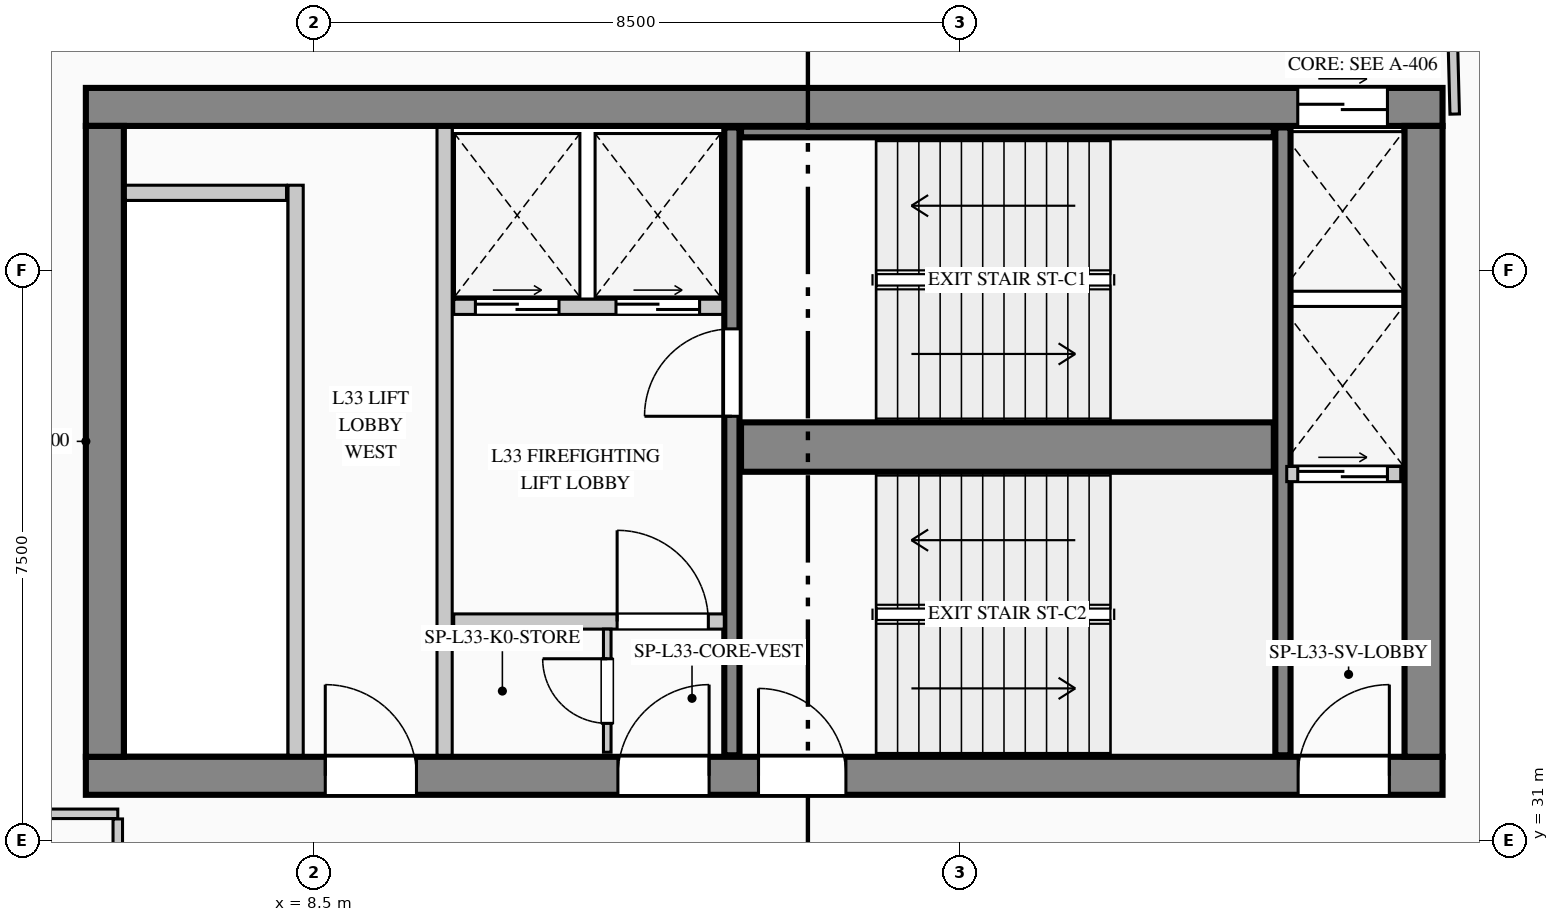
"""IFC4 building model, lengths in metres.
Left out: names, types, materials, properties, quantities, classifications, styles, units other than length and angle.
Written with IfcOpenShell. Run it as: python <this file> out.ifc"""

import sys

from ifc_helpers import new_model, si_unit, direction, frame, frame_2d, origin, place, context, subcontext, project, spatial, rectangle, extrude, element, fill, save


model = new_model("IFC4")
c1 = context("Model", 3, precision=1e-05, world=origin(), true_north=direction((0.0, 1.0)))
c2 = subcontext(c1, "Body", "Model", "MODEL_VIEW")
j1 = project(units=[si_unit("LENGTHUNIT", "METRE"), si_unit("PLANEANGLEUNIT", "RADIAN")], contexts=[c1])
p1 = place(None, origin())
s1 = spatial("IfcSite", under=j1, at=p1, CompositionType="ELEMENT")
p2 = place(p1, origin())
s2 = spatial("IfcBuilding", under=s1, at=p2, CompositionType="ELEMENT")
p3 = place(p2, frame((0.0, 0.0, 143.0)))
s3 = spatial("IfcBuildingStorey", under=s2, at=p3, CompositionType="ELEMENT", Elevation=143.0)
p4 = place(p3, frame((5.5, 40.65, 0.0), z_axis=(0.0, 0.0, 1.0), x_axis=(1.0, 0.0, 0.0)))
e1 = element("IfcWall", 1, at=p4, inside=s3, PredefinedType="SHEAR", context=c2, shape_type="SweptSolid", body=[
    extrude(rectangle(XDim=17.85, YDim=0.5, at=frame_2d((8.925, 0.0))), origin(), (0.0, 0.0, 1.0), 3.95),
])
p5 = place(p4, frame((15.945, 0.0, 0.0)))
e2 = element("IfcOpeningElement", 2, at=p5, cuts=e1, PredefinedType="OPENING", context=c2, shape_type="SweptSolid", body=[
    extrude(rectangle(XDim=1.18, YDim=2.25, at=frame_2d((0.59, 1.125))), frame((0.0, 0.26, 0.0), z_axis=(0.0, -1.0, 0.0), x_axis=(1.0, 0.0, 0.0)), (0.0, 0.0, 1.0), 0.52),
])
p6 = place(p3, frame((5.5, 31.85, 0.0), z_axis=(0.0, 0.0, 1.0), x_axis=(1.0, 0.0, 0.0)))
e3 = element("IfcWall", 3, at=p6, inside=s3, PredefinedType="SHEAR", context=c2, shape_type="SweptSolid", body=[
    extrude(rectangle(XDim=17.85, YDim=0.5, at=frame_2d((8.925, 0.0))), origin(), (0.0, 0.0, 1.0), 3.95),
])
p7 = place(p6, frame((3.15, 0.0, 0.0)))
e4 = element("IfcOpeningElement", 4, at=p7, cuts=e3, PredefinedType="OPENING", context=c2, shape_type="SweptSolid", body=[
    extrude(rectangle(XDim=1.2, YDim=2.2, at=frame_2d((0.6, 1.1))), frame((0.0, 0.26, 0.0), z_axis=(0.0, -1.0, 0.0), x_axis=(1.0, 0.0, 0.0)), (0.0, 0.0, 1.0), 0.52),
])
p8 = place(p6, frame((7.0, 0.0, 0.0)))
e5 = element("IfcOpeningElement", 5, at=p8, cuts=e3, PredefinedType="OPENING", context=c2, shape_type="SweptSolid", body=[
    extrude(rectangle(XDim=1.2, YDim=2.2, at=frame_2d((0.6, 1.1))), frame((0.0, 0.26, 0.0), z_axis=(0.0, -1.0, 0.0), x_axis=(1.0, 0.0, 0.0)), (0.0, 0.0, 1.0), 0.52),
])
p9 = place(p6, frame((8.85, 0.0, 0.0)))
e6 = element("IfcOpeningElement", 6, at=p9, cuts=e3, PredefinedType="OPENING", context=c2, shape_type="SweptSolid", body=[
    extrude(rectangle(XDim=1.15, YDim=2.2, at=frame_2d((0.575, 1.1))), frame((0.0, 0.26, 0.0), z_axis=(0.0, -1.0, 0.0), x_axis=(1.0, 0.0, 0.0)), (0.0, 0.0, 1.0), 0.52),
])
p10 = place(p6, frame((15.95, 0.0, 0.0)))
e7 = element("IfcOpeningElement", 7, at=p10, cuts=e3, PredefinedType="OPENING", context=c2, shape_type="SweptSolid", body=[
    extrude(rectangle(XDim=1.2, YDim=2.2, at=frame_2d((0.6, 1.1))), frame((0.0, 0.26, 0.0), z_axis=(0.0, -1.0, 0.0), x_axis=(1.0, 0.0, 0.0)), (0.0, 0.0, 1.0), 0.52),
])
for number, where, z_axis, x_axis in (
    (8, (5.75, 32.1, 0.0), (0.0, 0.0, 1.0), (0.0, 1.0, 0.0)),
    (9, (23.1, 32.1, 0.0), (0.0, 0.0, 1.0), (0.0, 1.0, 0.0)),
):
    element("IfcWall", number, at=place(p3, frame(where, z_axis=z_axis, x_axis=x_axis)), inside=s3, PredefinedType="SHEAR", context=c2, shape_type="SweptSolid", body=[
        extrude(rectangle(XDim=8.3, YDim=0.5, at=frame_2d((4.15, 0.0))), origin(), (0.0, 0.0, 1.0), 3.95),
    ])
p11 = place(p3, frame((14.0, 32.12, 0.0), z_axis=(0.0, 0.0, 1.0), x_axis=(0.0, 1.0, 0.0)))
e10 = element("IfcWall", 10, at=p11, inside=s3, PredefinedType="SHEAR", context=c2, shape_type="SweptSolid", body=[
    extrude(rectangle(XDim=8.26, YDim=0.2, at=frame_2d((4.13, 0.0))), origin(), (0.0, 0.0, 1.0), 3.95),
])
p12 = place(p11, frame((4.46, 0.0, 0.0)))
e11 = element("IfcOpeningElement", 11, at=p12, cuts=e10, PredefinedType="OPENING", context=c2, shape_type="SweptSolid", body=[
    extrude(rectangle(XDim=1.15, YDim=2.2, at=frame_2d((0.575, 1.1))), frame((0.0, 0.11, 0.0), z_axis=(0.0, -1.0, 0.0), x_axis=(1.0, 0.0, 0.0)), (0.0, 0.0, 1.0), 0.22),
])
p13 = place(p3, frame((14.12, 36.175, 0.0), z_axis=(0.0, 0.0, 1.0), x_axis=(1.0, 0.0, 0.0)))
e12 = element("IfcWall", 12, at=p13, inside=s3, PredefinedType="SHEAR", context=c2, shape_type="SweptSolid", body=[
    extrude(rectangle(XDim=7.01, YDim=0.65, at=frame_2d((3.505, 0.0))), origin(), (0.0, 0.0, 1.0), 3.95),
])
p14 = place(p3, frame((21.25, 32.12, 0.0), z_axis=(0.0, 0.0, 1.0), x_axis=(0.0, 1.0, 0.0)))
e13 = element("IfcWall", 13, at=p14, inside=s3, PredefinedType="SHEAR", context=c2, shape_type="SweptSolid", body=[
    extrude(rectangle(XDim=8.26, YDim=0.2, at=frame_2d((4.13, 0.0))), origin(), (0.0, 0.0, 1.0), 3.95),
])
p15 = place(p3, frame((14.12, 40.32, 0.0), z_axis=(0.0, 0.0, 1.0), x_axis=(1.0, 0.0, 0.0)))
e14 = element("IfcWall", 14, at=p15, inside=s3, PredefinedType="SHEAR", context=c2, shape_type="SweptSolid", body=[
    extrude(rectangle(XDim=7.01, YDim=0.14, at=frame_2d((3.505, 0.0))), origin(), (0.0, 0.0, 1.0), 3.95),
])
p16 = place(p3, frame((7.993, 4.73, 0.0), z_axis=(0.0, 0.0, 1.0), x_axis=(-0.136989009016, 0.990572567462, 0.0)))
e15 = element("IfcWall", 15, at=p16, inside=s3, PredefinedType="STANDARD", context=c2, shape_type="SweptSolid", body=[
    extrude(rectangle(XDim=36.888, YDim=0.26, at=frame_2d((18.444, 0.0))), origin(), (0.0, 0.0, 1.0), 3.69),
])
p17 = place(p16, frame((20.848, 0.0, 0.9)))
e16 = element("IfcOpeningElement", 16, at=p17, cuts=e15, PredefinedType="OPENING", context=c2, shape_type="SweptSolid", body=[
    extrude(rectangle(XDim=2.1, YDim=2.0, at=frame_2d((1.05, 1.0))), frame((0.0, 0.14, 0.0), z_axis=(0.0, -1.0, 0.0), x_axis=(1.0, 0.0, 0.0)), (0.0, 0.0, 1.0), 0.28),
])
p18 = place(p3, frame((8.26, 32.12, 0.0), z_axis=(0.0, 0.0, 1.0), x_axis=(0.0, 1.0, 0.0)))
e17 = element("IfcWall", 17, at=p18, inside=s3, PredefinedType="PARTITIONING", context=c2, shape_type="SweptSolid", body=[
    extrude(rectangle(XDim=7.5, YDim=0.2, at=frame_2d((3.75, 0.0))), origin(), (0.0, 0.0, 1.0), 3.69),
])
p19 = place(p3, frame((6.02, 39.52, 0.0), z_axis=(0.0, 0.0, 1.0), x_axis=(1.0, 0.0, 0.0)))
e18 = element("IfcWall", 18, at=p19, inside=s3, PredefinedType="PARTITIONING", context=c2, shape_type="SweptSolid", body=[
    extrude(rectangle(XDim=2.12, YDim=0.2, at=frame_2d((1.06, 0.0))), origin(), (0.0, 0.0, 1.0), 3.69),
])
p20 = place(p3, frame((10.22, 32.12, 0.0), z_axis=(0.0, 0.0, 1.0), x_axis=(0.0, 1.0, 0.0)))
e19 = element("IfcWall", 19, at=p20, inside=s3, PredefinedType="PARTITIONING", context=c2, shape_type="SweptSolid", body=[
    extrude(rectangle(XDim=8.26, YDim=0.2, at=frame_2d((4.13, 0.0))), origin(), (0.0, 0.0, 1.0), 3.69),
])
p21 = place(p3, frame((10.34, 38.02, 0.0), z_axis=(0.0, 0.0, 1.0), x_axis=(1.0, 0.0, 0.0)))
e20 = element("IfcWall", 20, at=p21, inside=s3, PredefinedType="PARTITIONING", context=c2, shape_type="SweptSolid", body=[
    extrude(rectangle(XDim=3.54, YDim=0.2, at=frame_2d((1.77, 0.0))), origin(), (0.0, 0.0, 1.0), 3.69),
])
p22 = place(p21, frame((0.285, 0.0, 0.0)))
e21 = element("IfcOpeningElement", 21, at=p22, cuts=e20, PredefinedType="OPENING", context=c2, shape_type="SweptSolid", body=[
    extrude(rectangle(XDim=1.1, YDim=2.2, at=frame_2d((0.55, 1.1))), frame((0.0, 0.11, 0.0), z_axis=(0.0, -1.0, 0.0), x_axis=(1.0, 0.0, 0.0)), (0.0, 0.0, 1.0), 0.22),
])
p23 = place(p21, frame((2.135, 0.0, 0.0)))
e22 = element("IfcOpeningElement", 22, at=p23, cuts=e20, PredefinedType="OPENING", context=c2, shape_type="SweptSolid", body=[
    extrude(rectangle(XDim=1.1, YDim=2.2, at=frame_2d((0.55, 1.1))), frame((0.0, 0.11, 0.0), z_axis=(0.0, -1.0, 0.0), x_axis=(1.0, 0.0, 0.0)), (0.0, 0.0, 1.0), 0.22),
])
p24 = place(p3, frame((10.34, 33.88, 0.0), z_axis=(0.0, 0.0, 1.0), x_axis=(1.0, 0.0, 0.0)))
e23 = element("IfcWall", 23, at=p24, inside=s3, PredefinedType="PARTITIONING", context=c2, shape_type="SweptSolid", body=[
    extrude(rectangle(XDim=3.56, YDim=0.2, at=frame_2d((1.78, 0.0))), origin(), (0.0, 0.0, 1.0), 3.69),
])
p25 = place(p24, frame((2.15, 0.0, 0.0)))
e24 = element("IfcOpeningElement", 24, at=p25, cuts=e23, PredefinedType="OPENING", context=c2, shape_type="SweptSolid", body=[
    extrude(rectangle(XDim=1.2, YDim=2.2, at=frame_2d((0.6, 1.1))), frame((0.0, 0.11, 0.0), z_axis=(0.0, -1.0, 0.0), x_axis=(1.0, 0.0, 0.0)), (0.0, 0.0, 1.0), 0.22),
])
p26 = place(p3, frame((12.36, 32.16, 0.0), z_axis=(0.0, 0.0, 1.0), x_axis=(0.0, 1.0, 0.0)))
e25 = element("IfcWall", 25, at=p26, inside=s3, PredefinedType="PARTITIONING", context=c2, shape_type="SweptSolid", body=[
    extrude(rectangle(XDim=1.62, YDim=0.1, at=frame_2d((0.81, 0.0))), origin(), (0.0, 0.0, 1.0), 3.69),
])
p27 = place(p26, frame((0.38, 0.0, 0.0)))
e26 = element("IfcOpeningElement", 26, at=p27, cuts=e25, PredefinedType="OPENING", context=c2, shape_type="SweptSolid", body=[
    extrude(rectangle(XDim=0.85, YDim=2.1, at=frame_2d((0.425, 1.05))), frame((0.0, 0.06, 0.0), z_axis=(0.0, -1.0, 0.0), x_axis=(1.0, 0.0, 0.0)), (0.0, 0.0, 1.0), 0.12),
])
p28 = place(p3, frame((21.3, 35.82, 0.0), z_axis=(0.0, 0.0, 1.0), x_axis=(1.0, 0.0, 0.0)))
e27 = element("IfcWall", 27, at=p28, inside=s3, PredefinedType="PARTITIONING", context=c2, shape_type="SweptSolid", body=[
    extrude(rectangle(XDim=1.5, YDim=0.2, at=frame_2d((0.75, 0.0))), origin(), (0.0, 0.0, 1.0), 3.69),
])
p29 = place(p28, frame((0.145, 0.0, 0.0)))
e28 = element("IfcOpeningElement", 28, at=p29, cuts=e27, PredefinedType="OPENING", context=c2, shape_type="SweptSolid", body=[
    extrude(rectangle(XDim=1.18, YDim=2.25, at=frame_2d((0.59, 1.125))), frame((0.0, 0.11, 0.0), z_axis=(0.0, -1.0, 0.0), x_axis=(1.0, 0.0, 0.0)), (0.0, 0.0, 1.0), 0.22),
])
p30 = place(p3, frame((4.448, 31.35, 0.0), z_axis=(0.0, 0.0, 1.0), x_axis=(1.0, 0.0, 0.0)))
e29 = element("IfcWall", 29, at=p30, inside=s3, PredefinedType="PARTITIONING", context=c2, shape_type="SweptSolid", body=[
    extrude(rectangle(XDim=1.472, YDim=0.125, at=frame_2d((0.736, 0.0))), origin(), (0.0, 0.0, 1.0), 3.69),
])
p31 = place(p3, frame((5.92, 31.282, 0.0), z_axis=(0.0, 0.0, 1.0), x_axis=(0.0, -1.0, 0.0)))
e30 = element("IfcWall", 30, at=p31, inside=s3, PredefinedType="PARTITIONING", context=c2, shape_type="SweptSolid", body=[
    extrude(rectangle(XDim=2.682, YDim=0.125, at=frame_2d((1.341, 0.0))), origin(), (0.0, 0.0, 1.0), 3.69),
])
p32 = place(p3, frame((23.51, 40.556, 0.0), z_axis=(0.0, 0.0, 1.0), x_axis=(-0.02567646332, 0.999670305266, 0.0)))
e31 = element("IfcWall", 31, at=p32, inside=s3, PredefinedType="PARTITIONING", context=c2, shape_type="SweptSolid", body=[
    extrude(rectangle(XDim=2.71, YDim=0.125, at=frame_2d((1.355, 0.0))), origin(), (0.0, 0.0, 1.0), 3.69),
])
p33 = place(p7, origin())
e32 = element("IfcDoor", 32, at=p33, inside=s3, OperationType="SINGLE_SWING_LEFT", PredefinedType="DOOR", context=c2, shape_type="SweptSolid", body=[
    extrude(rectangle(XDim=1.2, YDim=2.2, at=frame_2d((0.6, 1.1))), frame((0.0, 0.025, 0.0), z_axis=(0.0, -1.0, 0.0), x_axis=(1.0, 0.0, 0.0)), (0.0, 0.0, 1.0), 0.05),
])
fill(e4, e32)
p34 = place(p8, origin())
e33 = element("IfcDoor", 33, at=p34, inside=s3, OperationType="SINGLE_SWING_RIGHT", PredefinedType="DOOR", context=c2, shape_type="SweptSolid", body=[
    extrude(rectangle(XDim=1.2, YDim=2.2, at=frame_2d((0.6, 1.1))), frame((0.0, 0.025, 0.0), z_axis=(0.0, -1.0, 0.0), x_axis=(1.0, 0.0, 0.0)), (0.0, 0.0, 1.0), 0.05),
])
fill(e5, e33)
p35 = place(p9, origin())
e34 = element("IfcDoor", 34, at=p35, inside=s3, OperationType="SINGLE_SWING_LEFT", PredefinedType="DOOR", context=c2, shape_type="SweptSolid", body=[
    extrude(rectangle(XDim=1.15, YDim=2.2, at=frame_2d((0.575, 1.1))), frame((0.0, 0.025, 0.0), z_axis=(0.0, -1.0, 0.0), x_axis=(1.0, 0.0, 0.0)), (0.0, 0.0, 1.0), 0.05),
])
fill(e6, e34)
p36 = place(p10, origin())
e35 = element("IfcDoor", 35, at=p36, inside=s3, OperationType="SINGLE_SWING_RIGHT", PredefinedType="DOOR", context=c2, shape_type="SweptSolid", body=[
    extrude(rectangle(XDim=1.2, YDim=2.2, at=frame_2d((0.6, 1.1))), frame((0.0, 0.025, 0.0), z_axis=(0.0, -1.0, 0.0), x_axis=(1.0, 0.0, 0.0)), (0.0, 0.0, 1.0), 0.05),
])
fill(e7, e35)
p37 = place(p25, origin())
e36 = element("IfcDoor", 36, at=p37, inside=s3, OperationType="SINGLE_SWING_LEFT", PredefinedType="DOOR", context=c2, shape_type="SweptSolid", body=[
    extrude(rectangle(XDim=1.2, YDim=2.2, at=frame_2d((0.6, 1.1))), frame((0.0, 0.025, 0.0), z_axis=(0.0, -1.0, 0.0), x_axis=(1.0, 0.0, 0.0)), (0.0, 0.0, 1.0), 0.05),
])
fill(e24, e36)
p38 = place(p27, origin())
e37 = element("IfcDoor", 37, at=p38, inside=s3, OperationType="SINGLE_SWING_RIGHT", PredefinedType="DOOR", context=c2, shape_type="SweptSolid", body=[
    extrude(rectangle(XDim=0.85, YDim=2.1, at=frame_2d((0.425, 1.05))), frame((0.0, 0.025, 0.0), z_axis=(0.0, -1.0, 0.0), x_axis=(1.0, 0.0, 0.0)), (0.0, 0.0, 1.0), 0.05),
])
fill(e26, e37)
p39 = place(p12, origin())
e38 = element("IfcDoor", 38, at=p39, inside=s3, OperationType="SINGLE_SWING_LEFT", PredefinedType="DOOR", context=c2, shape_type="SweptSolid", body=[
    extrude(rectangle(XDim=1.15, YDim=2.2, at=frame_2d((0.575, 1.1))), frame((0.0, 0.025, 0.0), z_axis=(0.0, -1.0, 0.0), x_axis=(1.0, 0.0, 0.0)), (0.0, 0.0, 1.0), 0.05),
])
fill(e11, e38)
p40 = place(p22, origin())
e39 = element("IfcDoor", 39, at=p40, inside=s3, OperationType="DOUBLE_DOOR_SLIDING", PredefinedType="DOOR", context=c2, shape_type="SweptSolid", body=[
    extrude(rectangle(XDim=1.1, YDim=2.2, at=frame_2d((0.55, 1.1))), frame((0.0, 0.025, 0.0), z_axis=(0.0, -1.0, 0.0), x_axis=(1.0, 0.0, 0.0)), (0.0, 0.0, 1.0), 0.05),
])
fill(e21, e39)
p41 = place(p23, origin())
e40 = element("IfcDoor", 40, at=p41, inside=s3, OperationType="DOUBLE_DOOR_SLIDING", PredefinedType="DOOR", context=c2, shape_type="SweptSolid", body=[
    extrude(rectangle(XDim=1.1, YDim=2.2, at=frame_2d((0.55, 1.1))), frame((0.0, 0.025, 0.0), z_axis=(0.0, -1.0, 0.0), x_axis=(1.0, 0.0, 0.0)), (0.0, 0.0, 1.0), 0.05),
])
fill(e22, e40)
p42 = place(p5, origin())
e41 = element("IfcDoor", 41, at=p42, inside=s3, OperationType="DOUBLE_DOOR_SLIDING", PredefinedType="DOOR", context=c2, shape_type="SweptSolid", body=[
    extrude(rectangle(XDim=1.18, YDim=2.25, at=frame_2d((0.59, 1.125))), frame((0.0, 0.025, 0.0), z_axis=(0.0, -1.0, 0.0), x_axis=(1.0, 0.0, 0.0)), (0.0, 0.0, 1.0), 0.05),
])
fill(e2, e41)
p43 = place(p29, origin())
e42 = element("IfcDoor", 42, at=p43, inside=s3, OperationType="DOUBLE_DOOR_SLIDING", PredefinedType="DOOR", context=c2, shape_type="SweptSolid", body=[
    extrude(rectangle(XDim=1.18, YDim=2.25, at=frame_2d((0.59, 1.125))), frame((0.0, 0.025, 0.0), z_axis=(0.0, -1.0, 0.0), x_axis=(1.0, 0.0, 0.0)), (0.0, 0.0, 1.0), 0.05),
])
fill(e28, e42)
save(model, sys.argv[1])
